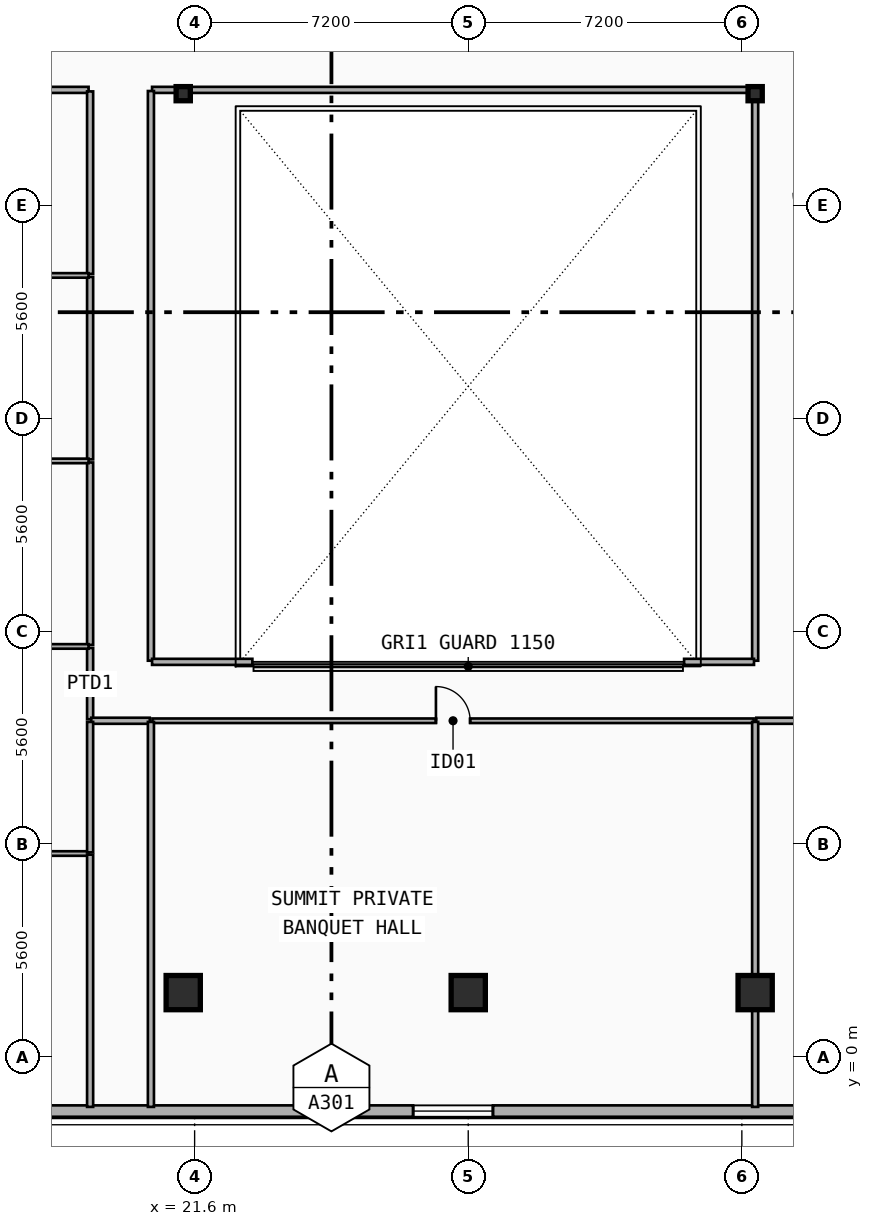
"""IFC4 building model, lengths in metres.
Left out: names, types, materials, properties, quantities, classifications, styles, units other than length and angle.
Written with IfcOpenShell. Run it as: python <this file> out.ifc"""

import sys

from ifc_helpers import new_model, si_unit, direction, frame, frame_2d, origin, origin_2d, place, context, subcontext, project, spatial, rectangle, i_section, extrude, element, fill, save


model = new_model("IFC4")
c1 = context("Model", 3, precision=1e-05, world=origin(), true_north=direction((0.0, 1.0)))
c2 = subcontext(c1, "Body", "Model", "MODEL_VIEW")
j1 = project(units=[si_unit("LENGTHUNIT", "METRE"), si_unit("PLANEANGLEUNIT", "RADIAN")], contexts=[c1])
p1 = place(None, origin())
s1 = spatial("IfcSite", under=j1, at=p1, CompositionType="ELEMENT")
p2 = place(p1, origin())
s2 = spatial("IfcBuilding", under=s1, at=p2, CompositionType="ELEMENT")
p3 = place(p2, frame((0.0, 0.0, 269.5)))
s3 = spatial("IfcBuildingStorey", under=s2, at=p3, CompositionType="ELEMENT", Elevation=269.5)
for number, where, z_axis, x_axis in (
    (1, (21.3, 25.35, 0.0), (0.0, 0.0, 1.0), (1.0, 0.0, 0.0)),
    (2, (36.35, 25.35, 0.0), (0.0, 0.0, 1.0), (1.0, 0.0, 0.0)),
):
    element("IfcColumn", number, at=place(p3, frame(where, z_axis=z_axis, x_axis=x_axis)), inside=s3, PredefinedType="COLUMN", context=c2, shape_type="SweptSolid", body=[
        extrude(i_section(OverallWidth=0.374, OverallDepth=0.372, WebThickness=0.017, FlangeThickness=0.027, FilletRadius=0.015, at=origin_2d()), origin(), (0.0, 0.0, 1.0), 3.7),
    ])
for number, where, z_axis, x_axis in (
    (3, (21.3, 1.806, 0.0), (0.0, -0.09, 0.996), (1.0, 0.0, 0.0)),
    (4, (28.8, 1.806, 0.0), (0.0, -0.09, 0.996), (1.0, 0.0, 0.0)),
    (5, (36.35, 1.806, 0.0), (0.0, -0.09, 0.996), (1.0, 0.0, 0.0)),
):
    element("IfcColumn", number, at=place(p3, frame(where, z_axis=z_axis, x_axis=x_axis)), inside=s3, PredefinedType="COLUMN", context=c2, shape_type="SweptSolid", body=[
        extrude(rectangle(XDim=0.9, YDim=0.9, at=origin_2d()), origin(), (0.0, 0.0, 1.0), 3.715),
    ])
p4 = place(p3, frame((45.2, -1.42, 0.0), z_axis=(0.0, 0.0, 1.0), x_axis=(-1.0, 0.0, 0.0)))
e6 = element("IfcWall", 6, at=p4, inside=s3, PredefinedType="SOLIDWALL", context=c2, shape_type="SweptSolid", body=[
    extrude(rectangle(XDim=32.8, YDim=0.3, at=frame_2d((16.4, 0.0))), origin(), (0.0, 0.0, 1.0), 3.42),
])
p5 = place(p4, frame((27.919, 0.0, 0.75)))
e7 = element("IfcOpeningElement", 7, at=p5, cuts=e6, PredefinedType="OPENING", context=c2, shape_type="SweptSolid", body=[
    extrude(rectangle(XDim=2.1, YDim=2.1, at=frame_2d((1.05, 1.05))), frame((0.0, 0.16, 0.0), z_axis=(0.0, -1.0, 0.0), x_axis=(1.0, 0.0, 0.0)), (0.0, 0.0, 1.0), 0.32),
])
p6 = place(p4, frame((15.75, 0.0, 0.75)))
e8 = element("IfcOpeningElement", 8, at=p6, cuts=e6, PredefinedType="OPENING", context=c2, shape_type="SweptSolid", body=[
    extrude(rectangle(XDim=2.1, YDim=2.1, at=frame_2d((1.05, 1.05))), frame((0.0, 0.16, 0.0), z_axis=(0.0, -1.0, 0.0), x_axis=(1.0, 0.0, 0.0)), (0.0, 0.0, 1.0), 0.32),
])
p7 = place(p4, frame((0.41, 0.0, 0.68)))
e9 = element("IfcOpeningElement", 9, at=p7, cuts=e6, PredefinedType="OPENING", context=c2, shape_type="SweptSolid", body=[
    extrude(rectangle(XDim=1.2, YDim=1.5, at=frame_2d((0.6, 0.75))), frame((0.0, 0.16, 0.0), z_axis=(0.0, -1.0, 0.0), x_axis=(1.0, 0.0, 0.0)), (0.0, 0.0, 1.0), 0.32),
])
p8 = place(p3, frame((13.652, 25.45, 0.0), z_axis=(0.0, 0.0, 1.0), x_axis=(1.0, 0.0, 0.0)))
e10 = element("IfcWall", 10, at=p8, inside=s3, PredefinedType="PARTITIONING", context=c2, shape_type="SweptSolid", body=[
    extrude(rectangle(XDim=5.158, YDim=0.16, at=frame_2d((2.579, 0.0))), origin(), (0.0, 0.0, 1.0), 3.42),
])
p9 = place(p3, frame((18.85, 8.89, 0.0), z_axis=(0.0, 0.0, 1.0), x_axis=(0.0, 1.0, 0.0)))
e11 = element("IfcWall", 11, at=p9, inside=s3, PredefinedType="PARTITIONING", context=c2, shape_type="SweptSolid", body=[
    extrude(rectangle(XDim=1.876, YDim=0.16, at=frame_2d((0.938, 0.0))), origin(), (0.0, 0.0, 1.0), 3.09),
])
p10 = place(p3, frame((18.85, 10.846, 0.0), z_axis=(0.0, 0.0, 1.0), x_axis=(0.0, 1.0, 0.0)))
e12 = element("IfcWall", 12, at=p10, inside=s3, PredefinedType="PARTITIONING", context=c2, shape_type="SweptSolid", body=[
    extrude(rectangle(XDim=4.801, YDim=0.16, at=frame_2d((2.4, 0.0))), origin(), (0.0, 0.0, 1.0), 2.96),
])
p11 = place(p3, frame((18.85, 15.727, 0.0), z_axis=(0.0, 0.0, 1.0), x_axis=(0.0, 1.0, 0.0)))
e13 = element("IfcWall", 13, at=p11, inside=s3, PredefinedType="PARTITIONING", context=c2, shape_type="SweptSolid", body=[
    extrude(rectangle(XDim=4.801, YDim=0.16, at=frame_2d((2.4, 0.0))), origin(), (0.0, 0.0, 1.0), 3.09),
])
p12 = place(p3, frame((18.85, 20.608, 0.0), z_axis=(0.0, 0.0, 1.0), x_axis=(0.0, 1.0, 0.0)))
e14 = element("IfcWall", 14, at=p12, inside=s3, PredefinedType="PARTITIONING", context=c2, shape_type="SweptSolid", body=[
    extrude(rectangle(XDim=4.802, YDim=0.16, at=frame_2d((2.401, 0.0))), origin(), (0.0, 0.0, 1.0), 2.96),
])
p13 = place(p3, frame((20.49, 8.85, 0.0), z_axis=(0.0, 0.0, 1.0), x_axis=(1.0, 0.0, 0.0)))
e15 = element("IfcWall", 15, at=p13, inside=s3, PredefinedType="PARTITIONING", context=c2, shape_type="SweptSolid", body=[
    extrude(rectangle(XDim=15.82, YDim=0.12, at=frame_2d((7.91, 0.0))), origin(), (0.0, 0.0, 1.0), 2.7),
])
p14 = place(p13, frame((7.46, 0.0, 0.0)))
e16 = element("IfcOpeningElement", 16, at=p14, cuts=e15, PredefinedType="OPENING", context=c2, shape_type="SweptSolid", body=[
    extrude(rectangle(XDim=0.9, YDim=2.1, at=frame_2d((0.45, 1.05))), frame((0.0, 0.07, 0.0), z_axis=(0.0, -1.0, 0.0), x_axis=(1.0, 0.0, 0.0)), (0.0, 0.0, 1.0), 0.14),
])
p15 = place(p3, frame((13.652, 5.357, 0.0), z_axis=(0.0, 0.0, 1.0), x_axis=(1.0, 0.0, 0.0)))
e17 = element("IfcWall", 17, at=p15, inside=s3, PredefinedType="PARTITIONING", context=c2, shape_type="SweptSolid", body=[
    extrude(rectangle(XDim=5.158, YDim=0.12, at=frame_2d((2.579, 0.0))), origin(), (0.0, 0.0, 1.0), 2.96),
])
for number, where, z_axis, x_axis in (
    (18, (13.652, 10.806, 0.0), (0.0, 0.0, 1.0), (1.0, 0.0, 0.0)),
    (19, (13.652, 15.687, 0.0), (0.0, 0.0, 1.0), (1.0, 0.0, 0.0)),
    (20, (13.652, 20.568, 0.0), (0.0, 0.0, 1.0), (1.0, 0.0, 0.0)),
):
    element("IfcWall", number, at=place(p3, frame(where, z_axis=z_axis, x_axis=x_axis)), inside=s3, PredefinedType="PARTITIONING", context=c2, shape_type="SweptSolid", body=[
        extrude(rectangle(XDim=5.158, YDim=0.12, at=frame_2d((2.579, 0.0))), origin(), (0.0, 0.0, 1.0), 3.42),
    ])
p16 = place(p3, frame((20.48, 25.45, 0.0), z_axis=(0.0, 0.0, 1.0), x_axis=(1.0, 0.0, 0.0)))
e21 = element("IfcWall", 21, at=p16, inside=s3, PredefinedType="PARTITIONING", context=c2, shape_type="SweptSolid", body=[
    extrude(rectangle(XDim=15.84, YDim=0.16, at=frame_2d((7.92, 0.0))), origin(), (0.0, 0.0, 1.0), 2.7),
])
p17 = place(p3, frame((18.88, 8.85, 0.0), z_axis=(0.0, 0.0, 1.0), x_axis=(1.0, 0.0, 0.0)))
e22 = element("IfcWall", 22, at=p17, inside=s3, PredefinedType="PARTITIONING", context=c2, shape_type="SweptSolid", body=[
    extrude(rectangle(XDim=1.54, YDim=0.16, at=frame_2d((0.77, 0.0))), origin(), (0.0, 0.0, 1.0), 3.42),
])
p18 = place(p3, frame((20.45, 10.43, 0.0), z_axis=(0.0, 0.0, 1.0), x_axis=(0.0, 1.0, 0.0)))
e23 = element("IfcWall", 23, at=p18, inside=s3, PredefinedType="PARTITIONING", context=c2, shape_type="SweptSolid", body=[
    extrude(rectangle(XDim=14.99, YDim=0.16, at=frame_2d((7.495, 0.0))), origin(), (0.0, 0.0, 1.0), 2.96),
])
p19 = place(p3, frame((36.38, 8.85, 0.0), z_axis=(0.0, 0.0, 1.0), x_axis=(1.0, 0.0, 0.0)))
e24 = element("IfcWall", 24, at=p19, inside=s3, PredefinedType="PARTITIONING", context=c2, shape_type="SweptSolid", body=[
    extrude(rectangle(XDim=1.94, YDim=0.16, at=frame_2d((0.97, 0.0))), origin(), (0.0, 0.0, 1.0), 2.7),
])
p20 = place(p3, frame((36.35, 10.43, 0.0), z_axis=(0.0, 0.0, 1.0), x_axis=(0.0, 1.0, 0.0)))
e25 = element("IfcWall", 25, at=p20, inside=s3, PredefinedType="PARTITIONING", context=c2, shape_type="SweptSolid", body=[
    extrude(rectangle(XDim=14.99, YDim=0.16, at=frame_2d((7.495, 0.0))), origin(), (0.0, 0.0, 1.0), 2.7),
])
p21 = place(p3, frame((20.48, 10.4, 0.0), z_axis=(0.0, 0.0, 1.0), x_axis=(1.0, 0.0, 0.0)))
e26 = element("IfcWall", 26, at=p21, inside=s3, PredefinedType="PARTITIONING", context=c2, shape_type="SweptSolid", body=[
    extrude(rectangle(XDim=2.64, YDim=0.16, at=frame_2d((1.32, 0.0))), origin(), (0.0, 0.0, 1.0), 2.7),
])
p22 = place(p3, frame((34.48, 10.4, 0.0), z_axis=(0.0, 0.0, 1.0), x_axis=(1.0, 0.0, 0.0)))
e27 = element("IfcWall", 27, at=p22, inside=s3, PredefinedType="PARTITIONING", context=c2, shape_type="SweptSolid", body=[
    extrude(rectangle(XDim=1.84, YDim=0.16, at=frame_2d((0.92, 0.0))), origin(), (0.0, 0.0, 1.0), 2.7),
])
p23 = place(p3, frame((18.85, -1.31, 0.0), z_axis=(0.0, 0.0, 1.0), x_axis=(0.0, 1.0, 0.0)))
e28 = element("IfcWall", 28, at=p23, inside=s3, PredefinedType="PARTITIONING", context=c2, shape_type="SweptSolid", body=[
    extrude(rectangle(XDim=6.637, YDim=0.16, at=frame_2d((3.318, 0.0))), origin(), (0.0, 0.0, 1.0), 2.96),
])
p24 = place(p3, frame((18.85, 5.387, 0.0), z_axis=(0.0, 0.0, 1.0), x_axis=(0.0, 1.0, 0.0)))
e29 = element("IfcWall", 29, at=p24, inside=s3, PredefinedType="PARTITIONING", context=c2, shape_type="SweptSolid", body=[
    extrude(rectangle(XDim=3.433, YDim=0.16, at=frame_2d((1.717, 0.0))), origin(), (0.0, 0.0, 1.0), 2.96),
])
p25 = place(p3, frame((20.45, -1.31, 0.0), z_axis=(0.0, 0.0, 1.0), x_axis=(0.0, 1.0, 0.0)))
e30 = element("IfcWall", 30, at=p25, inside=s3, PredefinedType="PARTITIONING", context=c2, shape_type="SweptSolid", body=[
    extrude(rectangle(XDim=10.13, YDim=0.16, at=frame_2d((5.065, 0.0))), origin(), (0.0, 0.0, 1.0), 2.96),
])
p26 = place(p3, frame((36.35, -1.31, 0.0), z_axis=(0.0, 0.0, 1.0), x_axis=(0.0, 1.0, 0.0)))
e31 = element("IfcWall", 31, at=p26, inside=s3, PredefinedType="PARTITIONING", context=c2, shape_type="SweptSolid", body=[
    extrude(rectangle(XDim=10.13, YDim=0.16, at=frame_2d((5.065, 0.0))), origin(), (0.0, 0.0, 1.0), 2.7),
])
p27 = place(p6, origin())
e32 = element("IfcWindow", 32, at=p27, inside=s3, PartitioningType="SINGLE_PANEL", PredefinedType="WINDOW", context=c2, shape_type="SweptSolid", body=[
    extrude(rectangle(XDim=2.1, YDim=2.1, at=frame_2d((1.05, 1.05))), frame((0.0, 0.03, 0.0), z_axis=(0.0, -1.0, 0.0), x_axis=(1.0, 0.0, 0.0)), (0.0, 0.0, 1.0), 0.06),
])
fill(e8, e32)
p28 = place(p14, origin())
e33 = element("IfcDoor", 33, at=p28, inside=s3, OperationType="SINGLE_SWING_LEFT", PredefinedType="DOOR", context=c2, shape_type="SweptSolid", body=[
    extrude(rectangle(XDim=0.9, YDim=2.1, at=frame_2d((0.45, 1.05))), frame((0.0, 0.025, 0.0), z_axis=(0.0, -1.0, 0.0), x_axis=(1.0, 0.0, 0.0)), (0.0, 0.0, 1.0), 0.05),
])
fill(e16, e33)
save(model, sys.argv[1])
